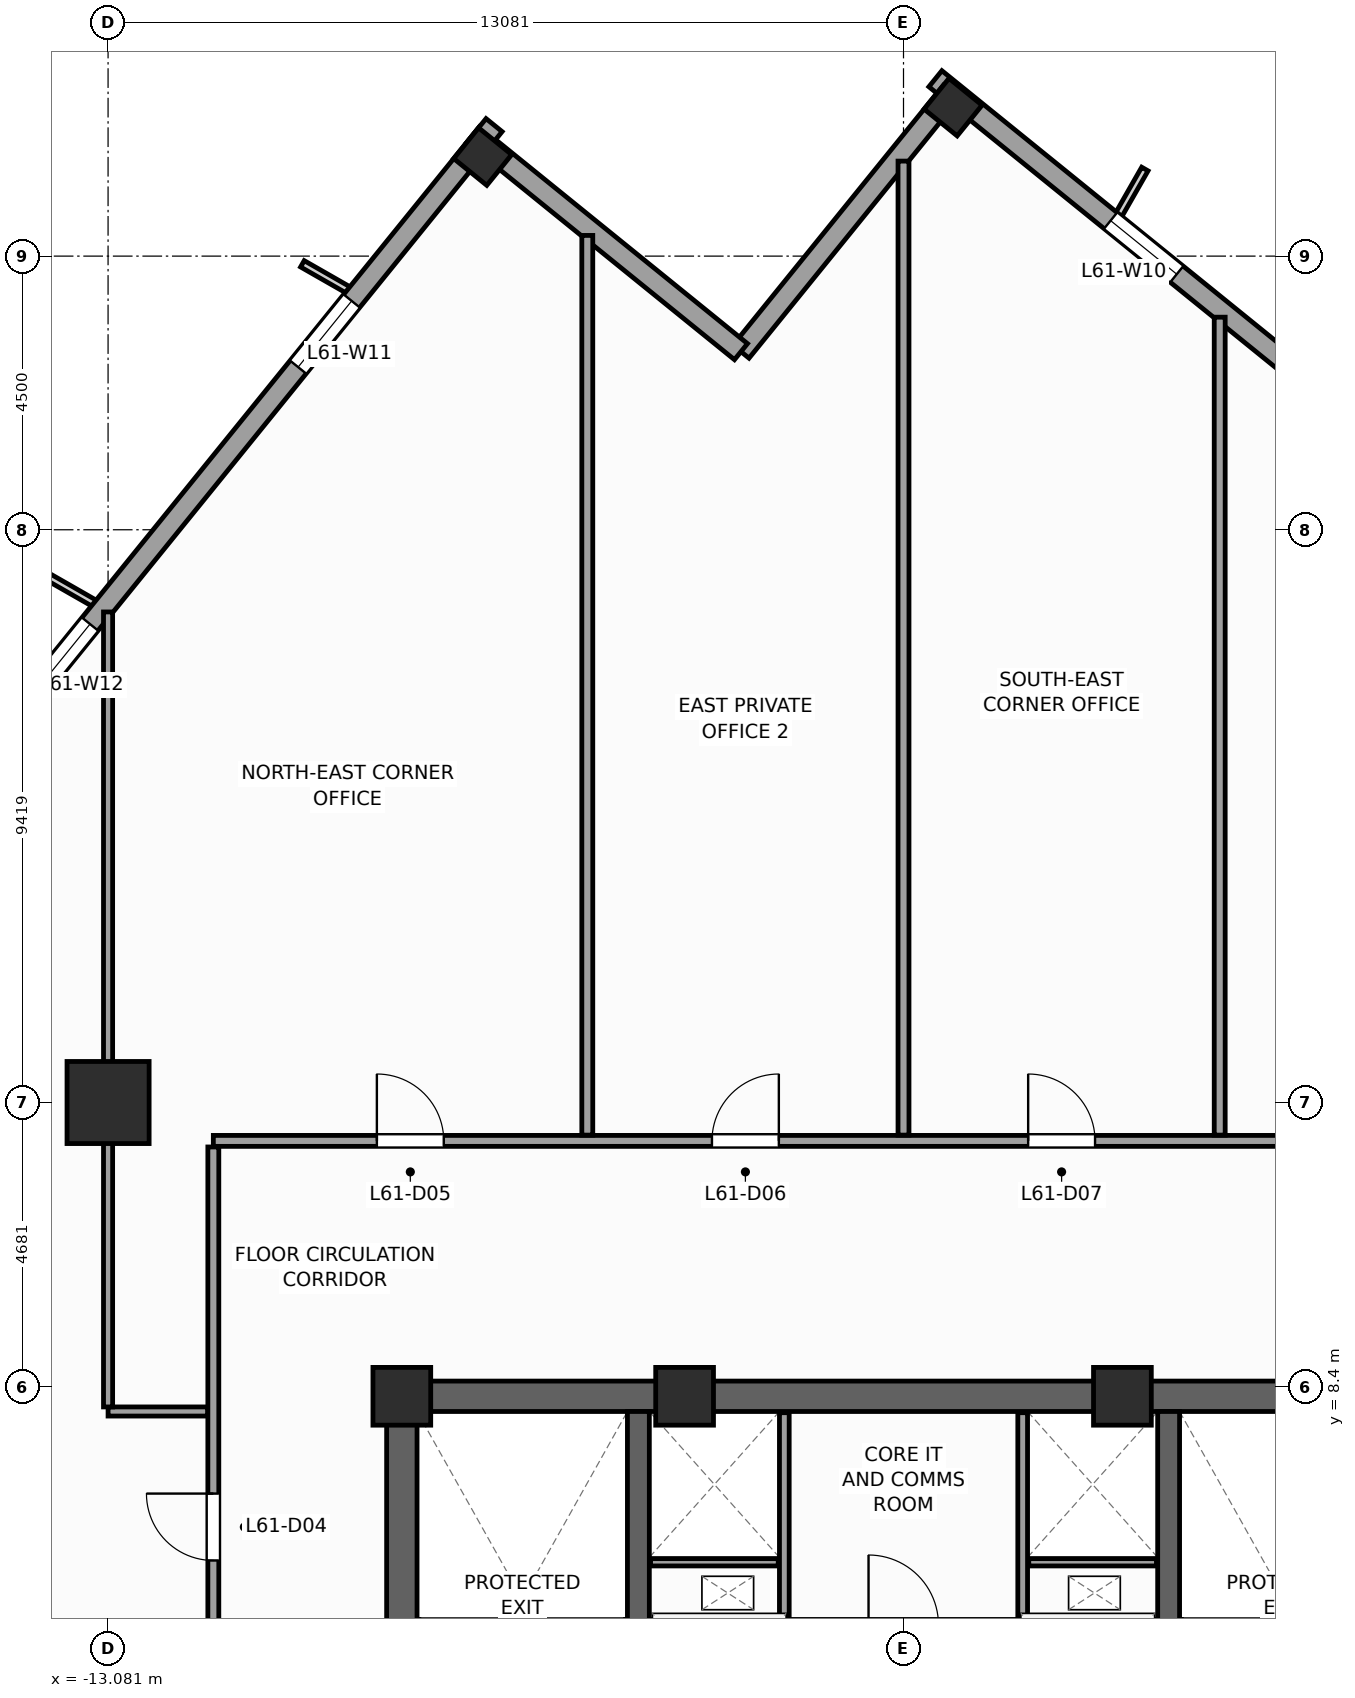
"""IFC4 building model, lengths in metres.
Left out: names, types, materials, properties, quantities, classifications, styles, units other than length and angle.
Written with IfcOpenShell. Run it as: python <this file> out.ifc"""

import sys

from ifc_helpers import new_model, si_unit, direction, frame, frame_2d, origin, origin_2d, place, context, subcontext, project, spatial, rectangle, extrude, source, transform, mapped, element, fill, save


model = new_model("IFC4")
c1 = context("Model", 3, precision=1e-05, world=origin(), true_north=direction((0.0, 1.0)))
c2 = subcontext(c1, "Body", "Model", "MODEL_VIEW")
j1 = project(units=[si_unit("LENGTHUNIT", "METRE"), si_unit("PLANEANGLEUNIT", "RADIAN")], contexts=[c1])
p1 = place(None, origin())
s1 = spatial("IfcSite", under=j1, at=p1, CompositionType="ELEMENT")
p2 = place(p1, origin())
s2 = spatial("IfcBuilding", under=s1, at=p2, CompositionType="ELEMENT")
p3 = place(p2, frame((0.0, 0.0, 252.4)))
s3 = spatial("IfcBuildingStorey", under=s2, at=p3, CompositionType="ELEMENT", Elevation=252.4)
p4 = place(p3, frame((-8.5, 8.25, 0.0), z_axis=(0.0, 0.0, 1.0), x_axis=(1.0, 0.0, 0.0)))
e1 = element("IfcWall", 1, at=p4, inside=s3, PredefinedType="SHEAR", context=c2, shape_type="SweptSolid", body=[
    extrude(rectangle(XDim=17.0, YDim=0.5, at=frame_2d((8.5, 0.0))), origin(), (0.0, 0.0, 1.0), 3.9),
])
p5 = place(p3, frame((-8.25, -8.0, 0.0), z_axis=(0.0, 0.0, 1.0), x_axis=(0.0, 1.0, 0.0)))
e2 = element("IfcWall", 2, at=p5, inside=s3, PredefinedType="SHEAR", context=c2, shape_type="SweptSolid", body=[
    extrude(rectangle(XDim=16.0, YDim=0.5, at=frame_2d((8.0, 0.0))), origin(), (0.0, 0.0, 1.0), 3.9),
])
p6 = place(p5, frame((4.69, 0.0, 0.0)))
e3 = element("IfcOpeningElement", 3, at=p6, cuts=e2, PredefinedType="OPENING", context=c2, shape_type="SweptSolid", body=[
    extrude(rectangle(XDim=1.3, YDim=2.2, at=frame_2d((0.65, 1.1))), frame((0.0, 0.26, 0.0), z_axis=(0.0, -1.0, 0.0), x_axis=(1.0, 0.0, 0.0)), (0.0, 0.0, 1.0), 0.52),
])
for number, where, z_axis, x_axis in (
    (4, (-4.36, -8.0, 0.0), (0.0, 0.0, 1.0), (0.0, 1.0, 0.0)),
    (5, (4.36, -8.0, 0.0), (0.0, 0.0, 1.0), (0.0, 1.0, 0.0)),
):
    element("IfcWall", number, at=place(p3, frame(where, z_axis=z_axis, x_axis=x_axis)), inside=s3, PredefinedType="SHEAR", context=c2, shape_type="SweptSolid", body=[
        extrude(rectangle(XDim=16.0, YDim=0.36, at=frame_2d((8.0, 0.0))), origin(), (0.0, 0.0, 1.0), 3.9),
    ])
m1 = source(origin(), c2, "Body", "SweptSolid", [
    extrude(rectangle(XDim=0.95, YDim=0.95, at=origin_2d()), origin(), (0.0, 0.0, 1.0), 3.9),
])
for number, where, z_axis, x_axis in (
    (6, (-8.25, 8.25, 0.0), (0.0, 0.0, 1.0), (1.0, 0.0, 0.0)),
    (7, (-3.6, 8.25, 0.0), (0.0, 0.0, 1.0), (1.0, 0.0, 0.0)),
    (8, (3.6, 8.25, 0.0), (0.0, 0.0, 1.0), (1.0, 0.0, 0.0)),
):
    element("IfcColumn", number, at=place(p3, frame(where, z_axis=z_axis, x_axis=x_axis)), inside=s3, PredefinedType="PILASTER", context=c2, shape_type="MappedRepresentation", body=[
        mapped(m1, transform((0.0, 0.0, 0.0), scale=1.0)),
    ])
m2 = source(origin(), c2, "Body", "SweptSolid", [
    extrude(rectangle(XDim=1.35, YDim=1.35, at=origin_2d()), origin(), (0.0, 0.0, 1.0), 3.9),
])
p7 = place(p3, frame((-13.081, 13.081, 0.0), z_axis=(0.0, 0.0, 1.0), x_axis=(1.0, 0.0, 0.0)))
e9 = element("IfcColumn", 9, at=p7, inside=s3, PredefinedType="COLUMN", context=c2, shape_type="MappedRepresentation", body=[
    mapped(m2, transform((0.0, 0.0, 0.0), scale=1.0)),
])
m3 = source(origin(), c2, "Body", "SweptSolid", [
    extrude(rectangle(XDim=0.65, YDim=0.7, at=origin_2d()), origin(), (0.0, 0.0, 1.0), 3.9),
])
for number, where, z_axis, x_axis in (
    (10, (0.815, 29.45, 0.0), (0.0, 0.0, 1.0), (0.629, 0.777, 0.0)),
    (11, (-6.92, 28.637, 0.0), (0.0, 0.0, 1.0), (0.629, 0.777, 0.0)),
):
    element("IfcColumn", number, at=place(p3, frame(where, z_axis=z_axis, x_axis=x_axis)), inside=s3, PredefinedType="COLUMN", context=c2, shape_type="MappedRepresentation", body=[
        mapped(m3, transform((0.0, 0.0, 0.0), scale=1.0)),
    ])
p8 = place(p3, frame((29.154, 6.733, 0.0), z_axis=(0.0, 0.0, 1.0), x_axis=(-0.77714192302, 0.629325378072, 0.0)))
e12 = element("IfcWall", 12, at=p8, inside=s3, PredefinedType="STANDARD", context=c2, shape_type="SweptSolid", body=[
    extrude(rectangle(XDim=36.84, YDim=0.34, at=frame_2d((18.42, 0.0))), origin(), (0.0, 0.0, 1.0), 2.96),
])
p9 = place(p8, frame((23.495, 0.0, 0.0)))
e13 = element("IfcOpeningElement", 13, at=p9, cuts=e12, PredefinedType="OPENING", context=c2, shape_type="SweptSolid", body=[
    extrude(rectangle(XDim=1.05, YDim=2.25, at=frame_2d((0.525, 1.125))), frame((0.0, 0.18, 0.0), z_axis=(0.0, -1.0, 0.0), x_axis=(1.0, 0.0, 0.0)), (0.0, 0.0, 1.0), 0.36),
])
p10 = place(p8, frame((3.721, 0.0, 0.48)))
e14 = element("IfcOpeningElement", 14, at=p10, cuts=e12, PredefinedType="OPENING", context=c2, shape_type="SweptSolid", body=[
    extrude(rectangle(XDim=1.4, YDim=2.4, at=frame_2d((0.7, 1.2))), frame((0.0, 0.18, 0.0), z_axis=(0.0, -1.0, 0.0), x_axis=(1.0, 0.0, 0.0)), (0.0, 0.0, 1.0), 0.36),
])
p11 = place(p8, frame((9.809, 0.0, 0.58)))
e15 = element("IfcOpeningElement", 15, at=p11, cuts=e12, PredefinedType="OPENING", context=c2, shape_type="SweptSolid", body=[
    extrude(rectangle(XDim=1.75, YDim=2.3, at=frame_2d((0.875, 1.15))), frame((0.0, 0.18, 0.0), z_axis=(0.0, -1.0, 0.0), x_axis=(1.0, 0.0, 0.0)), (0.0, 0.0, 1.0), 0.36),
])
p12 = place(p8, frame((16.058, 0.0, 0.58)))
e16 = element("IfcOpeningElement", 16, at=p12, cuts=e12, PredefinedType="OPENING", context=c2, shape_type="SweptSolid", body=[
    extrude(rectangle(XDim=1.75, YDim=2.3, at=frame_2d((0.875, 1.15))), frame((0.0, 0.18, 0.0), z_axis=(0.0, -1.0, 0.0), x_axis=(1.0, 0.0, 0.0)), (0.0, 0.0, 1.0), 0.36),
])
p13 = place(p8, frame((25.676, 0.0, 0.58)))
e17 = element("IfcOpeningElement", 17, at=p13, cuts=e12, PredefinedType="OPENING", context=c2, shape_type="SweptSolid", body=[
    extrude(rectangle(XDim=1.75, YDim=2.3, at=frame_2d((0.875, 1.15))), frame((0.0, 0.18, 0.0), z_axis=(0.0, -1.0, 0.0), x_axis=(1.0, 0.0, 0.0)), (0.0, 0.0, 1.0), 0.36),
])
p14 = place(p8, frame((31.732, 0.0, 0.48)))
e18 = element("IfcOpeningElement", 18, at=p14, cuts=e12, PredefinedType="OPENING", context=c2, shape_type="SweptSolid", body=[
    extrude(rectangle(XDim=1.4, YDim=2.4, at=frame_2d((0.7, 1.2))), frame((0.0, 0.18, 0.0), z_axis=(0.0, -1.0, 0.0), x_axis=(1.0, 0.0, 0.0)), (0.0, 0.0, 1.0), 0.36),
])
p15 = place(p3, frame((0.789, 29.703, 0.0), z_axis=(0.0, 0.0, 1.0), x_axis=(-0.629323365087, -0.77714355312, 0.0)))
e19 = element("IfcWall", 19, at=p15, inside=s3, PredefinedType="STANDARD", context=c2, shape_type="SweptSolid", body=[
    extrude(rectangle(XDim=5.5, YDim=0.34, at=frame_2d((2.75, 0.0))), origin(), (0.0, 0.0, 1.0), 3.66),
])
p16 = place(p3, frame((-2.673, 25.429, 0.0), z_axis=(0.0, 0.0, 1.0), x_axis=(-0.777162640055, 0.629299794138, 0.0)))
e20 = element("IfcWall", 20, at=p16, inside=s3, PredefinedType="STANDARD", context=c2, shape_type="SweptSolid", body=[
    extrude(rectangle(XDim=5.67, YDim=0.34, at=frame_2d((2.835, 0.0))), origin(), (0.0, 0.0, 1.0), 3.66),
])
p17 = place(p3, frame((-6.733, 29.154, 0.0), z_axis=(0.0, 0.0, 1.0), x_axis=(-0.629325378072, -0.77714192302, 0.0)))
e21 = element("IfcWall", 21, at=p17, inside=s3, PredefinedType="STANDARD", context=c2, shape_type="SweptSolid", body=[
    extrude(rectangle(XDim=36.84, YDim=0.34, at=frame_2d((18.42, 0.0))), origin(), (0.0, 0.0, 1.0), 2.96),
])
p18 = place(p17, frame((3.721, 0.0, 0.48)))
e22 = element("IfcOpeningElement", 22, at=p18, cuts=e21, PredefinedType="OPENING", context=c2, shape_type="SweptSolid", body=[
    extrude(rectangle(XDim=1.4, YDim=2.4, at=frame_2d((0.7, 1.2))), frame((0.0, 0.18, 0.0), z_axis=(0.0, -1.0, 0.0), x_axis=(1.0, 0.0, 0.0)), (0.0, 0.0, 1.0), 0.36),
])
p19 = place(p17, frame((10.559, 0.0, 0.58)))
e23 = element("IfcOpeningElement", 23, at=p19, cuts=e21, PredefinedType="OPENING", context=c2, shape_type="SweptSolid", body=[
    extrude(rectangle(XDim=1.75, YDim=2.3, at=frame_2d((0.875, 1.15))), frame((0.0, 0.18, 0.0), z_axis=(0.0, -1.0, 0.0), x_axis=(1.0, 0.0, 0.0)), (0.0, 0.0, 1.0), 0.36),
])
p20 = place(p17, frame((16.058, 0.0, 0.58)))
e24 = element("IfcOpeningElement", 24, at=p20, cuts=e21, PredefinedType="OPENING", context=c2, shape_type="SweptSolid", body=[
    extrude(rectangle(XDim=1.75, YDim=2.3, at=frame_2d((0.875, 1.15))), frame((0.0, 0.18, 0.0), z_axis=(0.0, -1.0, 0.0), x_axis=(1.0, 0.0, 0.0)), (0.0, 0.0, 1.0), 0.36),
])
p21 = place(p17, frame((24.176, 0.0, 0.58)))
e25 = element("IfcOpeningElement", 25, at=p21, cuts=e21, PredefinedType="OPENING", context=c2, shape_type="SweptSolid", body=[
    extrude(rectangle(XDim=1.75, YDim=2.3, at=frame_2d((0.875, 1.15))), frame((0.0, 0.18, 0.0), z_axis=(0.0, -1.0, 0.0), x_axis=(1.0, 0.0, 0.0)), (0.0, 0.0, 1.0), 0.36),
])
p22 = place(p17, frame((30.232, 0.0, 0.48)))
e26 = element("IfcOpeningElement", 26, at=p22, cuts=e21, PredefinedType="OPENING", context=c2, shape_type="SweptSolid", body=[
    extrude(rectangle(XDim=1.4, YDim=2.4, at=frame_2d((0.7, 1.2))), frame((0.0, 0.18, 0.0), z_axis=(0.0, -1.0, 0.0), x_axis=(1.0, 0.0, 0.0)), (0.0, 0.0, 1.0), 0.36),
])
for number, where, z_axis, x_axis in (
    (27, (-1.96, 4.58, 0.0), (0.0, 0.0, 1.0), (0.0, 1.0, 0.0)),
    (28, (1.96, 4.58, 0.0), (0.0, 0.0, 1.0), (0.0, 1.0, 0.0)),
):
    element("IfcWall", number, at=place(p3, frame(where, z_axis=z_axis, x_axis=x_axis)), inside=s3, PredefinedType="PARTITIONING", context=c2, shape_type="SweptSolid", body=[
        extrude(rectangle(XDim=3.4, YDim=0.16, at=frame_2d((1.7, 0.0))), origin(), (0.0, 0.0, 1.0), 3.66),
    ])
for number, where, z_axis, x_axis in (
    (29, (-4.16, 5.52, 0.0), (0.0, 0.0, 1.0), (1.0, 0.0, 0.0)),
    (30, (2.06, 5.52, 0.0), (0.0, 0.0, 1.0), (1.0, 0.0, 0.0)),
):
    element("IfcWall", number, at=place(p3, frame(where, z_axis=z_axis, x_axis=x_axis)), inside=s3, PredefinedType="PARTITIONING", context=c2, shape_type="SweptSolid", body=[
        extrude(rectangle(XDim=2.1, YDim=0.12, at=frame_2d((1.05, 0.0))), origin(), (0.0, 0.0, 1.0), 3.66),
    ])
p23 = place(p3, frame((-11.35, 12.45, 0.0), z_axis=(0.0, 0.0, 1.0), x_axis=(1.0, 0.0, 0.0)))
e31 = element("IfcWall", 31, at=p23, inside=s3, PredefinedType="PARTITIONING", context=c2, shape_type="SweptSolid", body=[
    extrude(rectangle(XDim=21.65, YDim=0.18, at=frame_2d((10.825, 0.0))), origin(), (0.0, 0.0, 1.0), 3.66),
])
p24 = place(p23, frame((2.689, 0.0, 0.0)))
e32 = element("IfcOpeningElement", 32, at=p24, cuts=e31, PredefinedType="OPENING", context=c2, shape_type="SweptSolid", body=[
    extrude(rectangle(XDim=1.1, YDim=2.2, at=frame_2d((0.55, 1.1))), frame((0.0, 0.1, 0.0), z_axis=(0.0, -1.0, 0.0), x_axis=(1.0, 0.0, 0.0)), (0.0, 0.0, 1.0), 0.2),
])
p25 = place(p23, frame((8.2, 0.0, 0.0)))
e33 = element("IfcOpeningElement", 33, at=p25, cuts=e31, PredefinedType="OPENING", context=c2, shape_type="SweptSolid", body=[
    extrude(rectangle(XDim=1.1, YDim=2.2, at=frame_2d((0.55, 1.1))), frame((0.0, 0.1, 0.0), z_axis=(0.0, -1.0, 0.0), x_axis=(1.0, 0.0, 0.0)), (0.0, 0.0, 1.0), 0.2),
])
p26 = place(p23, frame((13.4, 0.0, 0.0)))
e34 = element("IfcOpeningElement", 34, at=p26, cuts=e31, PredefinedType="OPENING", context=c2, shape_type="SweptSolid", body=[
    extrude(rectangle(XDim=1.1, YDim=2.2, at=frame_2d((0.55, 1.1))), frame((0.0, 0.1, 0.0), z_axis=(0.0, -1.0, 0.0), x_axis=(1.0, 0.0, 0.0)), (0.0, 0.0, 1.0), 0.2),
])
p27 = place(p23, frame((18.385, 0.0, 0.0)))
e35 = element("IfcOpeningElement", 35, at=p27, cuts=e31, PredefinedType="OPENING", context=c2, shape_type="SweptSolid", body=[
    extrude(rectangle(XDim=1.1, YDim=2.2, at=frame_2d((0.55, 1.1))), frame((0.0, 0.1, 0.0), z_axis=(0.0, -1.0, 0.0), x_axis=(1.0, 0.0, 0.0)), (0.0, 0.0, 1.0), 0.2),
])
p28 = place(p3, frame((-11.35, -11.3, 0.0), z_axis=(0.0, 0.0, 1.0), x_axis=(0.0, 1.0, 0.0)))
e36 = element("IfcWall", 36, at=p28, inside=s3, PredefinedType="PARTITIONING", context=c2, shape_type="SweptSolid", body=[
    extrude(rectangle(XDim=23.65, YDim=0.18, at=frame_2d((11.825, 0.0))), origin(), (0.0, 0.0, 1.0), 3.66),
])
p29 = place(p28, frame((13.1, 0.0, 0.0)))
e37 = element("IfcOpeningElement", 37, at=p29, cuts=e36, PredefinedType="OPENING", context=c2, shape_type="SweptSolid", body=[
    extrude(rectangle(XDim=1.1, YDim=2.2, at=frame_2d((0.55, 1.1))), frame((0.0, 0.1, 0.0), z_axis=(0.0, -1.0, 0.0), x_axis=(1.0, 0.0, 0.0)), (0.0, 0.0, 1.0), 0.2),
])
p30 = place(p28, frame((16.85, 0.0, 0.0)))
e38 = element("IfcOpeningElement", 38, at=p30, cuts=e36, PredefinedType="OPENING", context=c2, shape_type="SweptSolid", body=[
    extrude(rectangle(XDim=1.1, YDim=2.2, at=frame_2d((0.55, 1.1))), frame((0.0, 0.1, 0.0), z_axis=(0.0, -1.0, 0.0), x_axis=(1.0, 0.0, 0.0)), (0.0, 0.0, 1.0), 0.2),
])
p31 = place(p28, frame((5.0, 0.0, 0.0)))
e39 = element("IfcOpeningElement", 39, at=p31, cuts=e36, PredefinedType="OPENING", context=c2, shape_type="SweptSolid", body=[
    extrude(rectangle(XDim=1.1, YDim=2.2, at=frame_2d((0.55, 1.1))), frame((0.0, 0.1, 0.0), z_axis=(0.0, -1.0, 0.0), x_axis=(1.0, 0.0, 0.0)), (0.0, 0.0, 1.0), 0.2),
])
p32 = place(p28, frame((9.25, 0.0, 0.0)))
e40 = element("IfcOpeningElement", 40, at=p32, cuts=e36, PredefinedType="OPENING", context=c2, shape_type="SweptSolid", body=[
    extrude(rectangle(XDim=1.1, YDim=2.2, at=frame_2d((0.55, 1.1))), frame((0.0, 0.1, 0.0), z_axis=(0.0, -1.0, 0.0), x_axis=(1.0, 0.0, 0.0)), (0.0, 0.0, 1.0), 0.2),
])
p33 = place(p3, frame((-5.2, 12.545, 0.0), z_axis=(0.0, 0.0, 1.0), x_axis=(0.0, 1.0, 0.0)))
e41 = element("IfcWall", 41, at=p33, inside=s3, PredefinedType="PARTITIONING", context=c2, shape_type="SweptSolid", body=[
    extrude(rectangle(XDim=14.795, YDim=0.18, at=frame_2d((7.398, 0.0))), origin(), (0.0, 0.0, 1.0), 3.66),
])
p34 = place(p3, frame((0.0, 12.545, 0.0), z_axis=(0.0, 0.0, 1.0), x_axis=(0.0, 1.0, 0.0)))
e42 = element("IfcWall", 42, at=p34, inside=s3, PredefinedType="PARTITIONING", context=c2, shape_type="SweptSolid", body=[
    extrude(rectangle(XDim=16.018, YDim=0.18, at=frame_2d((8.009, 0.0))), origin(), (0.0, 0.0, 1.0), 3.66),
])
p35 = place(p3, frame((5.2, 12.545, 0.0), z_axis=(0.0, 0.0, 1.0), x_axis=(0.0, 1.0, 0.0)))
e43 = element("IfcWall", 43, at=p35, inside=s3, PredefinedType="PARTITIONING", context=c2, shape_type="SweptSolid", body=[
    extrude(rectangle(XDim=13.451, YDim=0.18, at=frame_2d((6.726, 0.0))), origin(), (0.0, 0.0, 1.0), 3.66),
])
p36 = place(p3, frame((-11.445, 8.0, 0.0), z_axis=(0.0, 0.0, 1.0), x_axis=(-1.0, 0.0, 0.0)))
e44 = element("IfcWall", 44, at=p36, inside=s3, PredefinedType="PARTITIONING", context=c2, shape_type="SweptSolid", body=[
    extrude(rectangle(XDim=1.636, YDim=0.15, at=frame_2d((0.818, 0.0))), origin(), (0.0, 0.0, 1.0), 3.66),
])
p37 = place(p3, frame((-13.081, 8.075, 0.0), z_axis=(0.0, 0.0, 1.0), x_axis=(0.0, 1.0, 0.0)))
e45 = element("IfcWall", 45, at=p37, inside=s3, PredefinedType="PARTITIONING", context=c2, shape_type="SweptSolid", body=[
    extrude(rectangle(XDim=13.073, YDim=0.15, at=frame_2d((6.537, 0.0))), origin(), (0.0, 0.0, 1.0), 2.76),
])
m4 = source(origin(), c2, "Body", "SweptSolid", [
    extrude(rectangle(XDim=1.4, YDim=2.4, at=frame_2d((0.7, 1.2))), frame((0.0, 0.03, 0.0), z_axis=(0.0, -1.0, 0.0), x_axis=(1.0, 0.0, 0.0)), (0.0, 0.0, 1.0), 0.06),
])
p38 = place(p14, origin())
e46 = element("IfcWindow", 46, at=p38, inside=s3, PartitioningType="SINGLE_PANEL", PredefinedType="WINDOW", context=c2, shape_type="MappedRepresentation", body=[
    mapped(m4, transform((0.0, 0.0, 0.0), scale=1.0)),
])
fill(e18, e46)
p39 = place(p18, origin())
e47 = element("IfcWindow", 47, at=p39, inside=s3, PartitioningType="SINGLE_PANEL", PredefinedType="WINDOW", context=c2, shape_type="MappedRepresentation", body=[
    mapped(m4, transform((0.0, 0.0, 0.0), scale=1.0)),
])
fill(e22, e47)
m5 = source(origin(), c2, "Body", "SweptSolid", [
    extrude(rectangle(XDim=1.75, YDim=2.3, at=frame_2d((0.875, 1.15))), frame((0.0, 0.03, 0.0), z_axis=(0.0, -1.0, 0.0), x_axis=(1.0, 0.0, 0.0)), (0.0, 0.0, 1.0), 0.06),
])
p40 = place(p19, origin())
e48 = element("IfcWindow", 48, at=p40, inside=s3, PartitioningType="SINGLE_PANEL", PredefinedType="WINDOW", context=c2, shape_type="MappedRepresentation", body=[
    mapped(m5, transform((0.0, 0.0, 0.0), scale=1.0)),
])
fill(e23, e48)
m6 = source(origin(), c2, "Body", "SweptSolid", [
    extrude(rectangle(XDim=1.1, YDim=2.2, at=frame_2d((0.55, 1.1))), frame((0.0, 0.025, 0.0), z_axis=(0.0, -1.0, 0.0), x_axis=(1.0, 0.0, 0.0)), (0.0, 0.0, 1.0), 0.05),
])
p41 = place(p30, origin())
e49 = element("IfcDoor", 49, at=p41, inside=s3, OperationType="SINGLE_SWING_RIGHT", PredefinedType="DOOR", context=c2, shape_type="MappedRepresentation", body=[
    mapped(m6, transform((0.0, 0.0, 0.0), scale=1.0)),
])
fill(e38, e49)
p42 = place(p24, origin())
e50 = element("IfcDoor", 50, at=p42, inside=s3, OperationType="SINGLE_SWING_LEFT", PredefinedType="DOOR", context=c2, shape_type="MappedRepresentation", body=[
    mapped(m6, transform((0.0, 0.0, 0.0), scale=1.0)),
])
fill(e32, e50)
p43 = place(p25, origin())
e51 = element("IfcDoor", 51, at=p43, inside=s3, OperationType="SINGLE_SWING_RIGHT", PredefinedType="DOOR", context=c2, shape_type="MappedRepresentation", body=[
    mapped(m6, transform((0.0, 0.0, 0.0), scale=1.0)),
])
fill(e33, e51)
p44 = place(p26, origin())
e52 = element("IfcDoor", 52, at=p44, inside=s3, OperationType="SINGLE_SWING_LEFT", PredefinedType="DOOR", context=c2, shape_type="MappedRepresentation", body=[
    mapped(m6, transform((0.0, 0.0, 0.0), scale=1.0)),
])
fill(e34, e52)
save(model, sys.argv[1])
